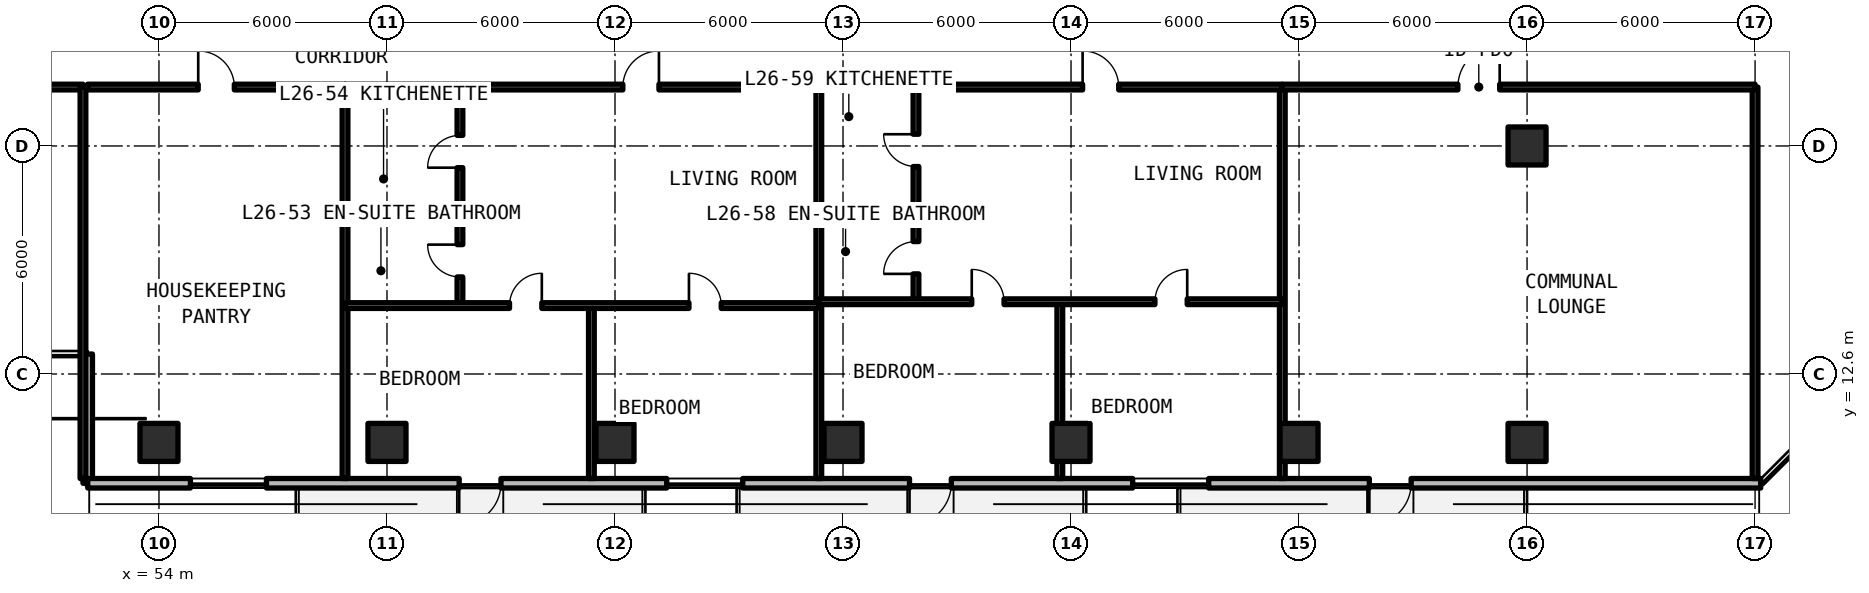
"""IFC4 building model, lengths in metres.
Left out: names, types, materials, properties, quantities, classifications, styles, units other than length and angle.
Written with IfcOpenShell. Run it as: python <this file> out.ifc"""

import sys

from ifc_helpers import new_model, si_unit, direction, frame, frame_2d, origin, origin_2d, place, context, subcontext, project, spatial, rectangle, extrude, element, fill, save


model = new_model("IFC4")
c1 = context("Model", 3, precision=1e-05, world=origin(), true_north=direction((0.0, 1.0)))
c2 = subcontext(c1, "Body", "Model", "MODEL_VIEW")
j1 = project(units=[si_unit("LENGTHUNIT", "METRE"), si_unit("PLANEANGLEUNIT", "RADIAN")], contexts=[c1])
p1 = place(None, origin())
s1 = spatial("IfcSite", under=j1, at=p1, CompositionType="ELEMENT")
p2 = place(p1, origin())
s2 = spatial("IfcBuilding", under=s1, at=p2, CompositionType="ELEMENT")
p3 = place(p2, frame((0.0, 0.0, 95.37)))
s3 = spatial("IfcBuildingStorey", under=s2, at=p3, CompositionType="ELEMENT", Elevation=95.37)
for number, where, z_axis, x_axis in (
    (1, (90.0, 18.6, 0.0), (0.0, 0.0, 1.0), (1.0, 0.0, 0.0)),
    (2, (54.0, 10.8, 0.0), (0.0, 0.0, 1.0), (1.0, 0.0, 0.0)),
    (3, (60.0, 10.8, 0.0), (0.0, 0.0, 1.0), (1.0, 0.0, 0.0)),
    (4, (66.0, 10.8, 0.0), (0.0, 0.0, 1.0), (1.0, 0.0, 0.0)),
    (5, (72.0, 10.8, 0.0), (0.0, 0.0, 1.0), (1.0, 0.0, 0.0)),
    (6, (78.0, 10.8, 0.0), (0.0, 0.0, 1.0), (1.0, 0.0, 0.0)),
    (7, (84.0, 10.8, 0.0), (0.0, 0.0, 1.0), (1.0, 0.0, 0.0)),
    (8, (90.0, 10.8, 0.0), (0.0, 0.0, 1.0), (1.0, 0.0, 0.0)),
):
    element("IfcColumn", number, at=place(p3, frame(where, z_axis=z_axis, x_axis=x_axis)), inside=s3, PredefinedType="COLUMN", context=c2, shape_type="SweptSolid", body=[
        extrude(rectangle(XDim=1.0, YDim=1.0, at=origin_2d()), origin(), (0.0, 0.0, 1.0), 3.3),
    ])
p4 = place(p3, frame((52.125, 13.125, 0.0), z_axis=(0.0, 0.0, 1.0), x_axis=(0.0, -1.0, 0.0)))
e9 = element("IfcWall", 9, at=p4, inside=s3, PredefinedType="SOLIDWALL", context=c2, shape_type="SweptSolid", body=[
    extrude(rectangle(XDim=3.4, YDim=0.25, at=frame_2d((1.7, 0.0))), origin(), (0.0, 0.0, 1.0), 3.08),
])
p5 = place(p3, frame((52.125, 9.725, 0.0), z_axis=(0.0, 0.0, 1.0), x_axis=(1.0, 0.0, 0.0)))
e10 = element("IfcWall", 10, at=p5, inside=s3, PredefinedType="SOLIDWALL", context=c2, shape_type="SweptSolid", body=[
    extrude(rectangle(XDim=44.023, YDim=0.25, at=frame_2d((22.012, 0.0))), origin(), (0.0, 0.0, 1.0), 3.08),
])
p6 = place(p5, frame((9.775, 0.0, 0.0)))
e11 = element("IfcOpeningElement", 11, at=p6, cuts=e10, PredefinedType="OPENING", context=c2, shape_type="SweptSolid", body=[
    extrude(rectangle(XDim=1.1, YDim=2.15, at=frame_2d((0.55, 1.075))), frame((0.0, 0.135, 0.0), z_axis=(0.0, -1.0, 0.0), x_axis=(1.0, 0.0, 0.0)), (0.0, 0.0, 1.0), 0.27),
])
p7 = place(p5, frame((21.625, 0.0, 0.0)))
e12 = element("IfcOpeningElement", 12, at=p7, cuts=e10, PredefinedType="OPENING", context=c2, shape_type="SweptSolid", body=[
    extrude(rectangle(XDim=1.1, YDim=2.15, at=frame_2d((0.55, 1.075))), frame((0.0, 0.135, 0.0), z_axis=(0.0, -1.0, 0.0), x_axis=(1.0, 0.0, 0.0)), (0.0, 0.0, 1.0), 0.27),
])
p8 = place(p5, frame((33.725, 0.0, 0.0)))
e13 = element("IfcOpeningElement", 13, at=p8, cuts=e10, PredefinedType="OPENING", context=c2, shape_type="SweptSolid", body=[
    extrude(rectangle(XDim=1.1, YDim=2.15, at=frame_2d((0.55, 1.075))), frame((0.0, 0.135, 0.0), z_axis=(0.0, -1.0, 0.0), x_axis=(1.0, 0.0, 0.0)), (0.0, 0.0, 1.0), 0.27),
])
p9 = place(p5, frame((2.703, 0.0, 0.78)))
e14 = element("IfcOpeningElement", 14, at=p9, cuts=e10, PredefinedType="OPENING", context=c2, shape_type="SweptSolid", body=[
    extrude(rectangle(XDim=2.0, YDim=1.66, at=frame_2d((1.0, 0.83))), frame((0.0, 0.135, 0.0), z_axis=(0.0, -1.0, 0.0), x_axis=(1.0, 0.0, 0.0)), (0.0, 0.0, 1.0), 0.27),
])
p10 = place(p5, frame((15.236, 0.0, 0.78)))
e15 = element("IfcOpeningElement", 15, at=p10, cuts=e10, PredefinedType="OPENING", context=c2, shape_type="SweptSolid", body=[
    extrude(rectangle(XDim=2.0, YDim=1.66, at=frame_2d((1.0, 0.83))), frame((0.0, 0.135, 0.0), z_axis=(0.0, -1.0, 0.0), x_axis=(1.0, 0.0, 0.0)), (0.0, 0.0, 1.0), 0.27),
])
p11 = place(p5, frame((27.498, 0.0, 0.78)))
e16 = element("IfcOpeningElement", 16, at=p11, cuts=e10, PredefinedType="OPENING", context=c2, shape_type="SweptSolid", body=[
    extrude(rectangle(XDim=2.0, YDim=1.66, at=frame_2d((1.0, 0.83))), frame((0.0, 0.135, 0.0), z_axis=(0.0, -1.0, 0.0), x_axis=(1.0, 0.0, 0.0)), (0.0, 0.0, 1.0), 0.27),
])
p12 = place(p3, frame((43.6, 20.15, 0.0), z_axis=(0.0, 0.0, 1.0), x_axis=(1.0, 0.0, 0.0)))
e17 = element("IfcWall", 17, at=p12, inside=s3, PredefinedType="SOLIDWALL", context=c2, shape_type="SweptSolid", body=[
    extrude(rectangle(XDim=8.4, YDim=0.15, at=frame_2d((4.2, 0.0))), origin(), (0.0, 0.0, 1.0), 2.35),
])
p13 = place(p12, frame((3.65, 0.0, 0.0)))
e18 = element("IfcOpeningElement", 18, at=p13, cuts=e17, PredefinedType="OPENING", context=c2, shape_type="SweptSolid", body=[
    extrude(rectangle(XDim=1.1, YDim=2.15, at=frame_2d((0.55, 1.075))), frame((0.0, 0.085, 0.0), z_axis=(0.0, -1.0, 0.0), x_axis=(1.0, 0.0, 0.0)), (0.0, 0.0, 1.0), 0.17),
])
for number, where, z_axis, x_axis in (
    (19, (52.0, 9.85, 0.0), (0.0, 0.0, 1.0), (0.0, 1.0, 0.0)),
    (20, (96.0, 9.85, 0.0), (0.0, 0.0, 1.0), (0.0, 1.0, 0.0)),
    (21, (58.896, 9.85, 0.0), (0.0, 0.0, 1.0), (0.0, 1.0, 0.0)),
):
    element("IfcWall", number, at=place(p3, frame(where, z_axis=z_axis, x_axis=x_axis)), inside=s3, PredefinedType="SOLIDWALL", context=c2, shape_type="SweptSolid", body=[
        extrude(rectangle(XDim=10.3, YDim=0.15, at=frame_2d((5.15, 0.0))), origin(), (0.0, 0.0, 1.0), 2.35),
    ])
p14 = place(p3, frame((52.12, 20.15, 0.0), z_axis=(0.0, 0.0, 1.0), x_axis=(1.0, 0.0, 0.0)))
e22 = element("IfcWall", 22, at=p14, inside=s3, PredefinedType="SOLIDWALL", context=c2, shape_type="SweptSolid", body=[
    extrude(rectangle(XDim=6.776, YDim=0.15, at=frame_2d((3.388, 0.0))), origin(), (0.0, 0.0, 1.0), 2.35),
])
p15 = place(p14, frame((2.913, 0.0, 0.0)))
e23 = element("IfcOpeningElement", 23, at=p15, cuts=e22, PredefinedType="OPENING", context=c2, shape_type="SweptSolid", body=[
    extrude(rectangle(XDim=0.95, YDim=2.15, at=frame_2d((0.475, 1.075))), frame((0.0, 0.085, 0.0), z_axis=(0.0, -1.0, 0.0), x_axis=(1.0, 0.0, 0.0)), (0.0, 0.0, 1.0), 0.17),
])
p16 = place(p3, frame((71.363, 9.85, 0.0), z_axis=(0.0, 0.0, 1.0), x_axis=(0.0, 1.0, 0.0)))
e24 = element("IfcWall", 24, at=p16, inside=s3, PredefinedType="SOLIDWALL", context=c2, shape_type="SweptSolid", body=[
    extrude(rectangle(XDim=10.3, YDim=0.15, at=frame_2d((5.15, 0.0))), origin(), (0.0, 0.0, 1.0), 2.35),
])
p17 = place(p3, frame((58.896, 16.758, 0.0), z_axis=(0.0, 0.0, 1.0), x_axis=(1.0, 0.0, 0.0)))
e25 = element("IfcWall", 25, at=p17, inside=s3, PredefinedType="PARTITIONING", context=c2, shape_type="SweptSolid", body=[
    extrude(rectangle(XDim=3.024, YDim=0.15, at=frame_2d((1.512, 0.0))), origin(), (0.0, 0.0, 1.0), 2.35),
])
p18 = place(p3, frame((61.92, 14.4, 0.0), z_axis=(0.0, 0.0, 1.0), x_axis=(0.0, 1.0, 0.0)))
e26 = element("IfcWall", 26, at=p18, inside=s3, PredefinedType="PARTITIONING", context=c2, shape_type="SweptSolid", body=[
    extrude(rectangle(XDim=5.75, YDim=0.15, at=frame_2d((2.875, 0.0))), origin(), (0.0, 0.0, 1.0), 2.35),
])
p19 = place(p18, frame((0.754, 0.0, 0.0)))
e27 = element("IfcOpeningElement", 27, at=p19, cuts=e26, PredefinedType="OPENING", context=c2, shape_type="SweptSolid", body=[
    extrude(rectangle(XDim=0.85, YDim=2.1, at=frame_2d((0.425, 1.05))), frame((0.0, 0.085, 0.0), z_axis=(0.0, -1.0, 0.0), x_axis=(1.0, 0.0, 0.0)), (0.0, 0.0, 1.0), 0.17),
])
p20 = place(p18, frame((3.628, 0.0, 0.0)))
e28 = element("IfcOpeningElement", 28, at=p20, cuts=e26, PredefinedType="OPENING", context=c2, shape_type="SweptSolid", body=[
    extrude(rectangle(XDim=0.85, YDim=2.1, at=frame_2d((0.425, 1.05))), frame((0.0, 0.085, 0.0), z_axis=(0.0, -1.0, 0.0), x_axis=(1.0, 0.0, 0.0)), (0.0, 0.0, 1.0), 0.17),
])
p21 = place(p3, frame((65.379, 9.85, 0.0), z_axis=(0.0, 0.0, 1.0), x_axis=(0.0, 1.0, 0.0)))
e29 = element("IfcWall", 29, at=p21, inside=s3, PredefinedType="PARTITIONING", context=c2, shape_type="SweptSolid", body=[
    extrude(rectangle(XDim=4.55, YDim=0.15, at=frame_2d((2.275, 0.0))), origin(), (0.0, 0.0, 1.0), 2.35),
])
p22 = place(p3, frame((58.896, 14.4, 0.0), z_axis=(0.0, 0.0, 1.0), x_axis=(1.0, 0.0, 0.0)))
e30 = element("IfcWall", 30, at=p22, inside=s3, PredefinedType="PARTITIONING", context=c2, shape_type="SweptSolid", body=[
    extrude(rectangle(XDim=12.468, YDim=0.15, at=frame_2d((6.234, 0.0))), origin(), (0.0, 0.0, 1.0), 2.35),
])
p23 = place(p22, frame((4.329, 0.0, 0.0)))
e31 = element("IfcOpeningElement", 31, at=p23, cuts=e30, PredefinedType="OPENING", context=c2, shape_type="SweptSolid", body=[
    extrude(rectangle(XDim=0.85, YDim=2.1, at=frame_2d((0.425, 1.05))), frame((0.0, 0.085, 0.0), z_axis=(0.0, -1.0, 0.0), x_axis=(1.0, 0.0, 0.0)), (0.0, 0.0, 1.0), 0.17),
])
p24 = place(p22, frame((9.05, 0.0, 0.0)))
e32 = element("IfcOpeningElement", 32, at=p24, cuts=e30, PredefinedType="OPENING", context=c2, shape_type="SweptSolid", body=[
    extrude(rectangle(XDim=0.85, YDim=2.1, at=frame_2d((0.425, 1.05))), frame((0.0, 0.085, 0.0), z_axis=(0.0, -1.0, 0.0), x_axis=(1.0, 0.0, 0.0)), (0.0, 0.0, 1.0), 0.17),
])
p25 = place(p3, frame((58.896, 20.15, 0.0), z_axis=(0.0, 0.0, 1.0), x_axis=(1.0, 0.0, 0.0)))
e33 = element("IfcWall", 33, at=p25, inside=s3, PredefinedType="SOLIDWALL", context=c2, shape_type="SweptSolid", body=[
    extrude(rectangle(XDim=12.468, YDim=0.15, at=frame_2d((6.234, 0.0))), origin(), (0.0, 0.0, 1.0), 2.35),
])
p26 = place(p25, frame((7.311, 0.0, 0.0)))
e34 = element("IfcOpeningElement", 34, at=p26, cuts=e33, PredefinedType="OPENING", context=c2, shape_type="SweptSolid", body=[
    extrude(rectangle(XDim=0.95, YDim=2.15, at=frame_2d((0.475, 1.075))), frame((0.0, 0.085, 0.0), z_axis=(0.0, -1.0, 0.0), x_axis=(1.0, 0.0, 0.0)), (0.0, 0.0, 1.0), 0.17),
])
p27 = place(p3, frame((83.56, 9.85, 0.0), z_axis=(0.0, 0.0, 1.0), x_axis=(0.0, 1.0, 0.0)))
e35 = element("IfcWall", 35, at=p27, inside=s3, PredefinedType="SOLIDWALL", context=c2, shape_type="SweptSolid", body=[
    extrude(rectangle(XDim=10.3, YDim=0.15, at=frame_2d((5.15, 0.0))), origin(), (0.0, 0.0, 1.0), 2.35),
])
p28 = place(p3, frame((71.363, 16.817, 0.0), z_axis=(0.0, 0.0, 1.0), x_axis=(1.0, 0.0, 0.0)))
e36 = element("IfcWall", 36, at=p28, inside=s3, PredefinedType="PARTITIONING", context=c2, shape_type="SweptSolid", body=[
    extrude(rectangle(XDim=2.557, YDim=0.15, at=frame_2d((1.278, 0.0))), origin(), (0.0, 0.0, 1.0), 2.35),
])
p29 = place(p3, frame((73.92, 14.501, 0.0), z_axis=(0.0, 0.0, 1.0), x_axis=(0.0, 1.0, 0.0)))
e37 = element("IfcWall", 37, at=p29, inside=s3, PredefinedType="PARTITIONING", context=c2, shape_type="SweptSolid", body=[
    extrude(rectangle(XDim=5.648, YDim=0.15, at=frame_2d((2.824, 0.0))), origin(), (0.0, 0.0, 1.0), 2.35),
])
p30 = place(p29, frame((0.733, 0.0, 0.0)))
e38 = element("IfcOpeningElement", 38, at=p30, cuts=e37, PredefinedType="OPENING", context=c2, shape_type="SweptSolid", body=[
    extrude(rectangle(XDim=0.85, YDim=2.1, at=frame_2d((0.425, 1.05))), frame((0.0, 0.085, 0.0), z_axis=(0.0, -1.0, 0.0), x_axis=(1.0, 0.0, 0.0)), (0.0, 0.0, 1.0), 0.17),
])
p31 = place(p29, frame((3.557, 0.0, 0.0)))
e39 = element("IfcOpeningElement", 39, at=p31, cuts=e37, PredefinedType="OPENING", context=c2, shape_type="SweptSolid", body=[
    extrude(rectangle(XDim=0.85, YDim=2.1, at=frame_2d((0.425, 1.05))), frame((0.0, 0.085, 0.0), z_axis=(0.0, -1.0, 0.0), x_axis=(1.0, 0.0, 0.0)), (0.0, 0.0, 1.0), 0.17),
])
p32 = place(p3, frame((77.705, 9.85, 0.0), z_axis=(0.0, 0.0, 1.0), x_axis=(0.0, 1.0, 0.0)))
e40 = element("IfcWall", 40, at=p32, inside=s3, PredefinedType="PARTITIONING", context=c2, shape_type="SweptSolid", body=[
    extrude(rectangle(XDim=4.651, YDim=0.15, at=frame_2d((2.326, 0.0))), origin(), (0.0, 0.0, 1.0), 2.35),
])
p33 = place(p3, frame((71.363, 14.501, 0.0), z_axis=(0.0, 0.0, 1.0), x_axis=(1.0, 0.0, 0.0)))
e41 = element("IfcWall", 41, at=p33, inside=s3, PredefinedType="PARTITIONING", context=c2, shape_type="SweptSolid", body=[
    extrude(rectangle(XDim=12.196, YDim=0.15, at=frame_2d((6.098, 0.0))), origin(), (0.0, 0.0, 1.0), 2.35),
])
p34 = place(p33, frame((4.024, 0.0, 0.0)))
e42 = element("IfcOpeningElement", 42, at=p34, cuts=e41, PredefinedType="OPENING", context=c2, shape_type="SweptSolid", body=[
    extrude(rectangle(XDim=0.85, YDim=2.1, at=frame_2d((0.425, 1.05))), frame((0.0, 0.085, 0.0), z_axis=(0.0, -1.0, 0.0), x_axis=(1.0, 0.0, 0.0)), (0.0, 0.0, 1.0), 0.17),
])
p35 = place(p33, frame((8.844, 0.0, 0.0)))
e43 = element("IfcOpeningElement", 43, at=p35, cuts=e41, PredefinedType="OPENING", context=c2, shape_type="SweptSolid", body=[
    extrude(rectangle(XDim=0.85, YDim=2.1, at=frame_2d((0.425, 1.05))), frame((0.0, 0.085, 0.0), z_axis=(0.0, -1.0, 0.0), x_axis=(1.0, 0.0, 0.0)), (0.0, 0.0, 1.0), 0.17),
])
p36 = place(p3, frame((71.363, 20.15, 0.0), z_axis=(0.0, 0.0, 1.0), x_axis=(1.0, 0.0, 0.0)))
e44 = element("IfcWall", 44, at=p36, inside=s3, PredefinedType="SOLIDWALL", context=c2, shape_type="SweptSolid", body=[
    extrude(rectangle(XDim=12.196, YDim=0.15, at=frame_2d((6.098, 0.0))), origin(), (0.0, 0.0, 1.0), 2.35),
])
p37 = place(p36, frame((6.942, 0.0, 0.0)))
e45 = element("IfcOpeningElement", 45, at=p37, cuts=e44, PredefinedType="OPENING", context=c2, shape_type="SweptSolid", body=[
    extrude(rectangle(XDim=0.95, YDim=2.15, at=frame_2d((0.475, 1.075))), frame((0.0, 0.085, 0.0), z_axis=(0.0, -1.0, 0.0), x_axis=(1.0, 0.0, 0.0)), (0.0, 0.0, 1.0), 0.17),
])
p38 = place(p3, frame((83.56, 20.15, 0.0), z_axis=(0.0, 0.0, 1.0), x_axis=(1.0, 0.0, 0.0)))
e46 = element("IfcWall", 46, at=p38, inside=s3, PredefinedType="SOLIDWALL", context=c2, shape_type="SweptSolid", body=[
    extrude(rectangle(XDim=12.44, YDim=0.15, at=frame_2d((6.22, 0.0))), origin(), (0.0, 0.0, 1.0), 2.35),
])
p39 = place(p38, frame((4.62, 0.0, 0.0)))
e47 = element("IfcOpeningElement", 47, at=p39, cuts=e46, PredefinedType="OPENING", context=c2, shape_type="SweptSolid", body=[
    extrude(rectangle(XDim=1.1, YDim=2.15, at=frame_2d((0.55, 1.075))), frame((0.0, 0.085, 0.0), z_axis=(0.0, -1.0, 0.0), x_axis=(1.0, 0.0, 0.0)), (0.0, 0.0, 1.0), 0.17),
])
p40 = place(p6, frame((1.1, 0.0, 0.0), z_axis=(0.0, 0.0, 1.0), x_axis=(-1.0, 0.0, 0.0)))
e48 = element("IfcDoor", 48, at=p40, inside=s3, OperationType="SINGLE_SWING_LEFT", PredefinedType="DOOR", context=c2, shape_type="SweptSolid", body=[
    extrude(rectangle(XDim=1.1, YDim=2.15, at=frame_2d((0.55, 1.075))), frame((0.0, 0.025, 0.0), z_axis=(0.0, -1.0, 0.0), x_axis=(1.0, 0.0, 0.0)), (0.0, 0.0, 1.0), 0.05),
])
fill(e11, e48)
p41 = place(p7, frame((1.1, 0.0, 0.0), z_axis=(0.0, 0.0, 1.0), x_axis=(-1.0, 0.0, 0.0)))
e49 = element("IfcDoor", 49, at=p41, inside=s3, OperationType="SINGLE_SWING_RIGHT", PredefinedType="DOOR", context=c2, shape_type="SweptSolid", body=[
    extrude(rectangle(XDim=1.1, YDim=2.15, at=frame_2d((0.55, 1.075))), frame((0.0, 0.025, 0.0), z_axis=(0.0, -1.0, 0.0), x_axis=(1.0, 0.0, 0.0)), (0.0, 0.0, 1.0), 0.05),
])
fill(e12, e49)
p42 = place(p8, frame((1.1, 0.0, 0.0), z_axis=(0.0, 0.0, 1.0), x_axis=(-1.0, 0.0, 0.0)))
e50 = element("IfcDoor", 50, at=p42, inside=s3, OperationType="SINGLE_SWING_LEFT", PredefinedType="DOOR", context=c2, shape_type="SweptSolid", body=[
    extrude(rectangle(XDim=1.1, YDim=2.15, at=frame_2d((0.55, 1.075))), frame((0.0, 0.025, 0.0), z_axis=(0.0, -1.0, 0.0), x_axis=(1.0, 0.0, 0.0)), (0.0, 0.0, 1.0), 0.05),
])
fill(e13, e50)
p43 = place(p9, origin())
e51 = element("IfcWindow", 51, at=p43, inside=s3, PartitioningType="SINGLE_PANEL", PredefinedType="WINDOW", context=c2, shape_type="SweptSolid", body=[
    extrude(rectangle(XDim=2.0, YDim=1.66, at=frame_2d((1.0, 0.83))), frame((0.0, 0.03, 0.0), z_axis=(0.0, -1.0, 0.0), x_axis=(1.0, 0.0, 0.0)), (0.0, 0.0, 1.0), 0.06),
])
fill(e14, e51)
p44 = place(p10, origin())
e52 = element("IfcWindow", 52, at=p44, inside=s3, PartitioningType="SINGLE_PANEL", PredefinedType="WINDOW", context=c2, shape_type="SweptSolid", body=[
    extrude(rectangle(XDim=2.0, YDim=1.66, at=frame_2d((1.0, 0.83))), frame((0.0, 0.03, 0.0), z_axis=(0.0, -1.0, 0.0), x_axis=(1.0, 0.0, 0.0)), (0.0, 0.0, 1.0), 0.06),
])
fill(e15, e52)
p45 = place(p11, origin())
e53 = element("IfcWindow", 53, at=p45, inside=s3, PartitioningType="SINGLE_PANEL", PredefinedType="WINDOW", context=c2, shape_type="SweptSolid", body=[
    extrude(rectangle(XDim=2.0, YDim=1.66, at=frame_2d((1.0, 0.83))), frame((0.0, 0.03, 0.0), z_axis=(0.0, -1.0, 0.0), x_axis=(1.0, 0.0, 0.0)), (0.0, 0.0, 1.0), 0.06),
])
fill(e16, e53)
p46 = place(p15, origin())
e54 = element("IfcDoor", 54, at=p46, inside=s3, OperationType="SINGLE_SWING_LEFT", PredefinedType="DOOR", context=c2, shape_type="SweptSolid", body=[
    extrude(rectangle(XDim=0.95, YDim=2.15, at=frame_2d((0.475, 1.075))), frame((0.0, 0.025, 0.0), z_axis=(0.0, -1.0, 0.0), x_axis=(1.0, 0.0, 0.0)), (0.0, 0.0, 1.0), 0.05),
])
fill(e23, e54)
p47 = place(p19, origin())
e55 = element("IfcDoor", 55, at=p47, inside=s3, OperationType="SINGLE_SWING_RIGHT", PredefinedType="DOOR", context=c2, shape_type="SweptSolid", body=[
    extrude(rectangle(XDim=0.85, YDim=2.1, at=frame_2d((0.425, 1.05))), frame((0.0, 0.025, 0.0), z_axis=(0.0, -1.0, 0.0), x_axis=(1.0, 0.0, 0.0)), (0.0, 0.0, 1.0), 0.05),
])
fill(e27, e55)
p48 = place(p20, origin())
e56 = element("IfcDoor", 56, at=p48, inside=s3, OperationType="SINGLE_SWING_LEFT", PredefinedType="DOOR", context=c2, shape_type="SweptSolid", body=[
    extrude(rectangle(XDim=0.85, YDim=2.1, at=frame_2d((0.425, 1.05))), frame((0.0, 0.025, 0.0), z_axis=(0.0, -1.0, 0.0), x_axis=(1.0, 0.0, 0.0)), (0.0, 0.0, 1.0), 0.05),
])
fill(e28, e56)
p49 = place(p23, origin())
e57 = element("IfcDoor", 57, at=p49, inside=s3, OperationType="SINGLE_SWING_RIGHT", PredefinedType="DOOR", context=c2, shape_type="SweptSolid", body=[
    extrude(rectangle(XDim=0.85, YDim=2.1, at=frame_2d((0.425, 1.05))), frame((0.0, 0.025, 0.0), z_axis=(0.0, -1.0, 0.0), x_axis=(1.0, 0.0, 0.0)), (0.0, 0.0, 1.0), 0.05),
])
fill(e31, e57)
p50 = place(p24, origin())
e58 = element("IfcDoor", 58, at=p50, inside=s3, OperationType="SINGLE_SWING_LEFT", PredefinedType="DOOR", context=c2, shape_type="SweptSolid", body=[
    extrude(rectangle(XDim=0.85, YDim=2.1, at=frame_2d((0.425, 1.05))), frame((0.0, 0.025, 0.0), z_axis=(0.0, -1.0, 0.0), x_axis=(1.0, 0.0, 0.0)), (0.0, 0.0, 1.0), 0.05),
])
fill(e32, e58)
p51 = place(p26, origin())
e59 = element("IfcDoor", 59, at=p51, inside=s3, OperationType="SINGLE_SWING_RIGHT", PredefinedType="DOOR", context=c2, shape_type="SweptSolid", body=[
    extrude(rectangle(XDim=0.95, YDim=2.15, at=frame_2d((0.475, 1.075))), frame((0.0, 0.025, 0.0), z_axis=(0.0, -1.0, 0.0), x_axis=(1.0, 0.0, 0.0)), (0.0, 0.0, 1.0), 0.05),
])
fill(e34, e59)
p52 = place(p30, origin())
e60 = element("IfcDoor", 60, at=p52, inside=s3, OperationType="SINGLE_SWING_LEFT", PredefinedType="DOOR", context=c2, shape_type="SweptSolid", body=[
    extrude(rectangle(XDim=0.85, YDim=2.1, at=frame_2d((0.425, 1.05))), frame((0.0, 0.025, 0.0), z_axis=(0.0, -1.0, 0.0), x_axis=(1.0, 0.0, 0.0)), (0.0, 0.0, 1.0), 0.05),
])
fill(e38, e60)
p53 = place(p31, origin())
e61 = element("IfcDoor", 61, at=p53, inside=s3, OperationType="SINGLE_SWING_RIGHT", PredefinedType="DOOR", context=c2, shape_type="SweptSolid", body=[
    extrude(rectangle(XDim=0.85, YDim=2.1, at=frame_2d((0.425, 1.05))), frame((0.0, 0.025, 0.0), z_axis=(0.0, -1.0, 0.0), x_axis=(1.0, 0.0, 0.0)), (0.0, 0.0, 1.0), 0.05),
])
fill(e39, e61)
p54 = place(p34, origin())
e62 = element("IfcDoor", 62, at=p54, inside=s3, OperationType="SINGLE_SWING_LEFT", PredefinedType="DOOR", context=c2, shape_type="SweptSolid", body=[
    extrude(rectangle(XDim=0.85, YDim=2.1, at=frame_2d((0.425, 1.05))), frame((0.0, 0.025, 0.0), z_axis=(0.0, -1.0, 0.0), x_axis=(1.0, 0.0, 0.0)), (0.0, 0.0, 1.0), 0.05),
])
fill(e42, e62)
p55 = place(p35, origin())
e63 = element("IfcDoor", 63, at=p55, inside=s3, OperationType="SINGLE_SWING_RIGHT", PredefinedType="DOOR", context=c2, shape_type="SweptSolid", body=[
    extrude(rectangle(XDim=0.85, YDim=2.1, at=frame_2d((0.425, 1.05))), frame((0.0, 0.025, 0.0), z_axis=(0.0, -1.0, 0.0), x_axis=(1.0, 0.0, 0.0)), (0.0, 0.0, 1.0), 0.05),
])
fill(e43, e63)
p56 = place(p37, origin())
e64 = element("IfcDoor", 64, at=p56, inside=s3, OperationType="SINGLE_SWING_LEFT", PredefinedType="DOOR", context=c2, shape_type="SweptSolid", body=[
    extrude(rectangle(XDim=0.95, YDim=2.15, at=frame_2d((0.475, 1.075))), frame((0.0, 0.025, 0.0), z_axis=(0.0, -1.0, 0.0), x_axis=(1.0, 0.0, 0.0)), (0.0, 0.0, 1.0), 0.05),
])
fill(e45, e64)
p57 = place(p39, origin())
e65 = element("IfcDoor", 65, at=p57, inside=s3, OperationType="SINGLE_SWING_RIGHT", PredefinedType="DOOR", context=c2, shape_type="SweptSolid", body=[
    extrude(rectangle(XDim=1.1, YDim=2.15, at=frame_2d((0.55, 1.075))), frame((0.0, 0.025, 0.0), z_axis=(0.0, -1.0, 0.0), x_axis=(1.0, 0.0, 0.0)), (0.0, 0.0, 1.0), 0.05),
])
fill(e47, e65)
save(model, sys.argv[1])
